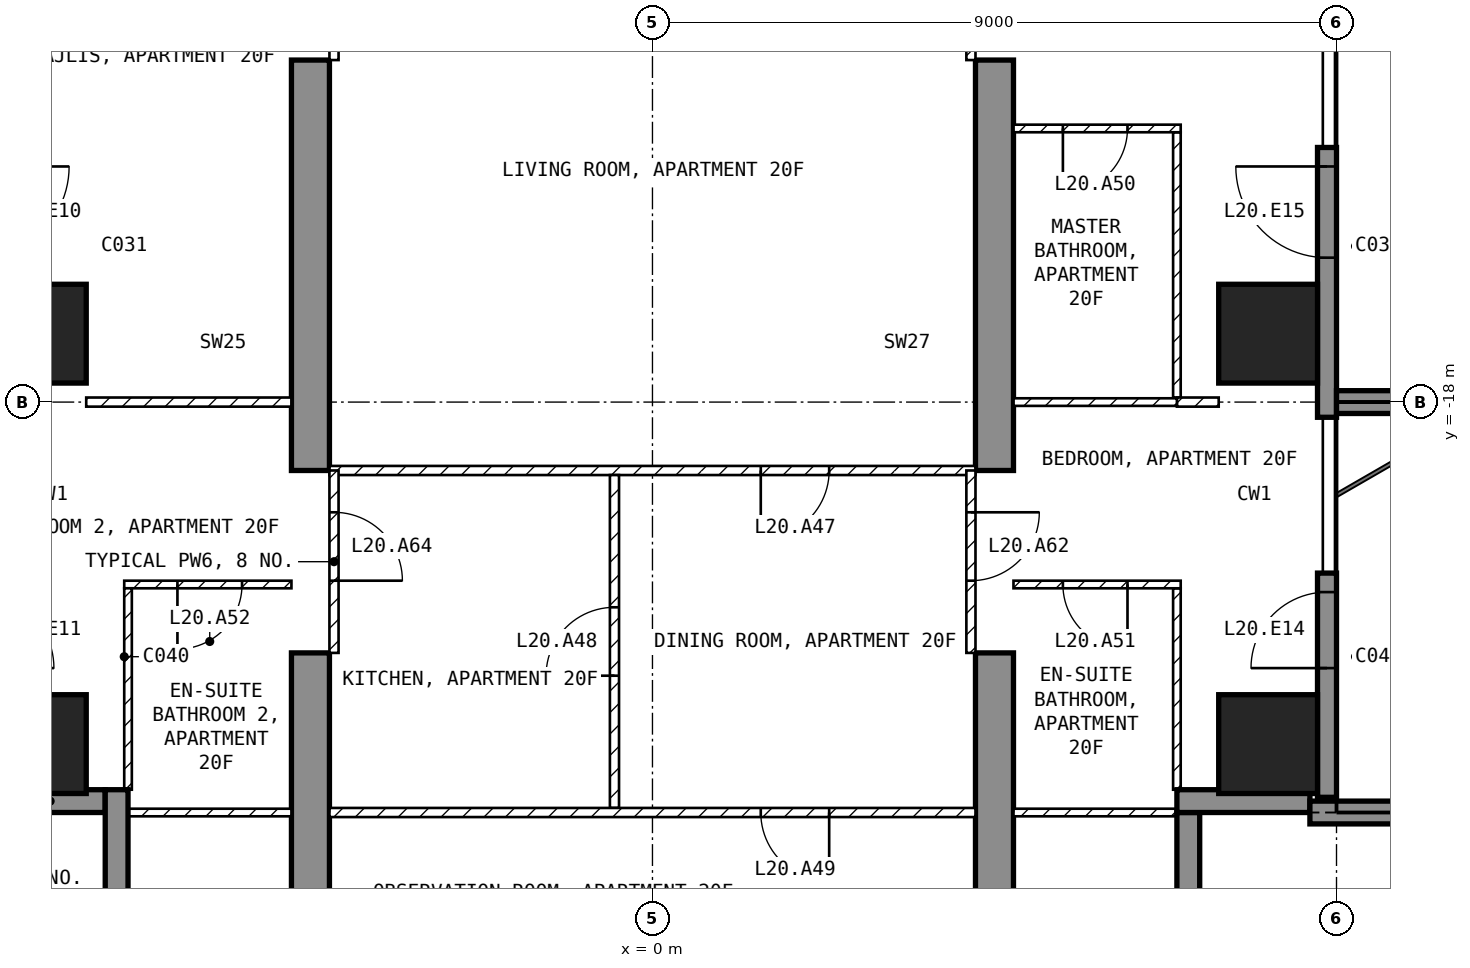
"""IFC4 building model, lengths in metres.
Left out: names, types, materials, properties, quantities, classifications, styles, units other than length and angle.
Written with IfcOpenShell. Run it as: python <this file> out.ifc"""

import sys

from ifc_helpers import new_model, si_unit, direction, frame, frame_2d, origin, origin_2d, place, context, subcontext, project, spatial, polyline, rectangle, outline, extrude, element, fill, save


model = new_model("IFC4")
c1 = context("Model", 3, precision=1e-05, world=origin(), true_north=direction((0.0, 1.0)))
c2 = subcontext(c1, "Body", "Model", "MODEL_VIEW")
j1 = project(units=[si_unit("LENGTHUNIT", "METRE"), si_unit("PLANEANGLEUNIT", "RADIAN")], contexts=[c1])
p1 = place(None, origin())
s1 = spatial("IfcSite", under=j1, at=p1, CompositionType="ELEMENT")
p2 = place(p1, origin())
s2 = spatial("IfcBuilding", under=s1, at=p2, CompositionType="ELEMENT")
p3 = place(p2, frame((0.0, 0.0, 89.0)))
s3 = spatial("IfcBuildingStorey", under=s2, at=p3, CompositionType="ELEMENT", Elevation=89.0)
for number, where, z_axis, x_axis in (
    (1, (-8.1, -22.5, -0.25), (0.0, 0.0, 1.0), (1.0, 0.0, 0.0)),
    (2, (-8.1, -17.1, -0.25), (0.0, 0.0, 1.0), (1.0, 0.0, 0.0)),
    (3, (8.1, -22.5, -0.25), (0.0, 0.0, 1.0), (1.0, 0.0, 0.0)),
    (4, (8.1, -17.1, -0.25), (0.0, 0.0, 1.0), (1.0, 0.0, 0.0)),
):
    element("IfcColumn", number, at=place(p3, frame(where, z_axis=z_axis, x_axis=x_axis)), inside=s3, PredefinedType="COLUMN", context=c2, shape_type="SweptSolid", body=[
        extrude(rectangle(XDim=1.3, YDim=1.3, at=origin_2d()), origin(), (0.0, 0.0, 1.0), 3.45),
    ])
for number, where, z_axis, x_axis in (
    (5, (-4.75, -25.45, -0.25), (1.0, 0.0, 0.0), (0.0, 1.0, 0.0)),
    (6, (4.25, -25.45, -0.25), (1.0, 0.0, 0.0), (0.0, 1.0, 0.0)),
):
    element("IfcWall", number, at=place(p3, frame(where, z_axis=z_axis, x_axis=x_axis)), inside=s3, PredefinedType="SHEAR", context=c2, shape_type="SweptSolid", body=[
        extrude(outline(polyline([(0.0, 0.0), (4.15, 0.0), (4.15, 2.65), (6.55, 2.65), (6.55, 0.0), (11.95, 0.0), (11.95, 2.65), (14.35, 2.65), (14.35, 0.0), (16.45, 0.0), (16.45, 3.45), (0.0, 3.45), (0.0, 0.0)])), origin(), (0.0, 0.0, 1.0), 0.5),
    ])
p4 = place(p3, frame((8.875, -23.2, 0.0), z_axis=(0.0, 0.0, 1.0), x_axis=(0.0, 1.0, 0.0)))
e7 = element("IfcWall", 7, at=p4, inside=s3, PredefinedType="SOLIDWALL", context=c2, shape_type="SweptSolid", body=[
    extrude(rectangle(XDim=2.95, YDim=0.25, at=frame_2d((1.475, 0.0))), origin(), (0.0, 0.0, 1.0), 3.2),
])
p5 = place(p4, frame((1.7, 0.0, 0.0)))
e8 = element("IfcOpeningElement", 8, at=p5, cuts=e7, PredefinedType="OPENING", context=c2, shape_type="SweptSolid", body=[
    extrude(rectangle(XDim=1.0, YDim=2.4, at=frame_2d((0.5, 1.2))), frame((0.0, 0.135, 0.0), z_axis=(0.0, -1.0, 0.0), x_axis=(1.0, 0.0, 0.0)), (0.0, 0.0, 1.0), 0.27),
])
p6 = place(p3, frame((8.875, -18.2, 0.0), z_axis=(0.0, 0.0, 1.0), x_axis=(0.0, 1.0, 0.0)))
e9 = element("IfcWall", 9, at=p6, inside=s3, PredefinedType="SOLIDWALL", context=c2, shape_type="SweptSolid", body=[
    extrude(rectangle(XDim=3.55, YDim=0.25, at=frame_2d((1.775, 0.0))), origin(), (0.0, 0.0, 1.0), 3.2),
])
p7 = place(p6, frame((2.1, 0.0, 0.0)))
e10 = element("IfcOpeningElement", 10, at=p7, cuts=e9, PredefinedType="OPENING", context=c2, shape_type="SweptSolid", body=[
    extrude(rectangle(XDim=1.2, YDim=2.4, at=frame_2d((0.6, 1.2))), frame((0.0, 0.135, 0.0), z_axis=(0.0, -1.0, 0.0), x_axis=(1.0, 0.0, 0.0)), (0.0, 0.0, 1.0), 0.27),
])
p8 = place(p3, frame((7.05, -25.2, 0.0), z_axis=(0.0, 0.0, 1.0), x_axis=(0.0, 1.0, 0.0)))
e11 = element("IfcWall", 11, at=p8, inside=s3, PredefinedType="SOLIDWALL", context=c2, shape_type="SweptSolid", body=[
    extrude(rectangle(XDim=1.8, YDim=0.3, at=frame_2d((0.9, 0.0))), origin(), (0.0, 0.0, 1.0), 3.2),
])
p9 = place(p3, frame((6.9, -23.25, 0.0), z_axis=(0.0, 0.0, 1.0), x_axis=(1.0, 0.0, 0.0)))
e12 = element("IfcWall", 12, at=p9, inside=s3, PredefinedType="SOLIDWALL", context=c2, shape_type="SweptSolid", body=[
    extrude(rectangle(XDim=1.75, YDim=0.3, at=frame_2d((0.875, 0.0))), origin(), (0.0, 0.0, 1.0), 3.2),
])
p10 = place(p3, frame((-8.65, -23.25, 0.0), z_axis=(0.0, 0.0, 1.0), x_axis=(1.0, 0.0, 0.0)))
e13 = element("IfcWall", 13, at=p10, inside=s3, PredefinedType="SOLIDWALL", context=c2, shape_type="SweptSolid", body=[
    extrude(rectangle(XDim=1.45, YDim=0.3, at=frame_2d((0.725, 0.0))), origin(), (0.0, 0.0, 1.0), 3.2),
])
p11 = place(p3, frame((-7.05, -23.1, 0.0), z_axis=(0.0, 0.0, 1.0), x_axis=(0.0, -1.0, 0.0)))
e14 = element("IfcWall", 14, at=p11, inside=s3, PredefinedType="SOLIDWALL", context=c2, shape_type="SweptSolid", body=[
    extrude(rectangle(XDim=1.8, YDim=0.3, at=frame_2d((0.9, 0.0))), origin(), (0.0, 0.0, 1.0), 3.2),
])
p12 = place(p3, frame((8.65, -23.4, 0.0), z_axis=(0.0, 0.0, 1.0), x_axis=(1.0, 0.0, 0.0)))
e15 = element("IfcWall", 15, at=p12, inside=s3, PredefinedType="SOLIDWALL", context=c2, shape_type="SweptSolid", body=[
    extrude(rectangle(XDim=3.05, YDim=0.3, at=frame_2d((1.525, 0.0))), origin(), (0.0, 0.0, 1.0), 3.2),
])
p13 = place(p3, frame((9.0, -18.0, 0.0), z_axis=(0.0, 0.0, 1.0), x_axis=(1.0, 0.0, 0.0)))
e16 = element("IfcWall", 16, at=p13, inside=s3, PredefinedType="SOLIDWALL", context=c2, shape_type="SweptSolid", body=[
    extrude(rectangle(XDim=2.7, YDim=0.3, at=frame_2d((1.35, 0.0))), origin(), (0.0, 0.0, 1.0), 3.2),
])
p14 = place(p3, frame((4.25, -18.9, 0.0), z_axis=(0.0, 0.0, 1.0), x_axis=(-1.0, 0.0, 0.0)))
e17 = element("IfcWall", 17, at=p14, inside=s3, PredefinedType="PARTITIONING", context=c2, shape_type="SweptSolid", body=[
    extrude(rectangle(XDim=8.5, YDim=0.12, at=frame_2d((4.25, 0.0))), origin(), (0.0, 0.0, 1.0), 3.2),
])
p15 = place(p14, frame((1.925, 0.0, 0.0)))
e18 = element("IfcOpeningElement", 18, at=p15, cuts=e17, PredefinedType="OPENING", context=c2, shape_type="SweptSolid", body=[
    extrude(rectangle(XDim=0.9, YDim=2.1, at=frame_2d((0.45, 1.05))), frame((0.0, 0.07, 0.0), z_axis=(0.0, -1.0, 0.0), x_axis=(1.0, 0.0, 0.0)), (0.0, 0.0, 1.0), 0.14),
])
p16 = place(p3, frame((-0.5, -23.34, 0.0), z_axis=(0.0, 0.0, 1.0), x_axis=(0.0, 1.0, 0.0)))
e19 = element("IfcWall", 19, at=p16, inside=s3, PredefinedType="PARTITIONING", context=c2, shape_type="SweptSolid", body=[
    extrude(rectangle(XDim=4.38, YDim=0.12, at=frame_2d((2.19, 0.0))), origin(), (0.0, 0.0, 1.0), 3.2),
])
p17 = place(p16, frame((1.74, 0.0, 0.0)))
e20 = element("IfcOpeningElement", 20, at=p17, cuts=e19, PredefinedType="OPENING", context=c2, shape_type="SweptSolid", body=[
    extrude(rectangle(XDim=0.9, YDim=2.1, at=frame_2d((0.45, 1.05))), frame((0.0, 0.07, 0.0), z_axis=(0.0, -1.0, 0.0), x_axis=(1.0, 0.0, 0.0)), (0.0, 0.0, 1.0), 0.14),
])
p18 = place(p3, frame((4.25, -23.4, 0.0), z_axis=(0.0, 0.0, 1.0), x_axis=(-1.0, 0.0, 0.0)))
e21 = element("IfcWall", 21, at=p18, inside=s3, PredefinedType="PARTITIONING", context=c2, shape_type="SweptSolid", body=[
    extrude(rectangle(XDim=8.5, YDim=0.12, at=frame_2d((4.25, 0.0))), origin(), (0.0, 0.0, 1.0), 3.2),
])
p19 = place(p18, frame((1.925, 0.0, 0.0)))
e22 = element("IfcOpeningElement", 22, at=p19, cuts=e21, PredefinedType="OPENING", context=c2, shape_type="SweptSolid", body=[
    extrude(rectangle(XDim=0.9, YDim=2.1, at=frame_2d((0.45, 1.05))), frame((0.0, 0.07, 0.0), z_axis=(0.0, -1.0, 0.0), x_axis=(1.0, 0.0, 0.0)), (0.0, 0.0, 1.0), 0.14),
])
p20 = place(p3, frame((6.9, -17.94, 0.0), z_axis=(0.0, 0.0, 1.0), x_axis=(0.0, 1.0, 0.0)))
e23 = element("IfcWall", 23, at=p20, inside=s3, PredefinedType="PARTITIONING", context=c2, shape_type="SweptSolid", body=[
    extrude(rectangle(XDim=3.49, YDim=0.1, at=frame_2d((1.745, 0.0))), origin(), (0.0, 0.0, 1.0), 3.2),
])
p21 = place(p3, frame((6.95, -14.4, 0.0), z_axis=(0.0, 0.0, 1.0), x_axis=(-1.0, 0.0, 0.0)))
e24 = element("IfcWall", 24, at=p21, inside=s3, PredefinedType="PARTITIONING", context=c2, shape_type="SweptSolid", body=[
    extrude(rectangle(XDim=2.2, YDim=0.1, at=frame_2d((1.1, 0.0))), origin(), (0.0, 0.0, 1.0), 3.2),
])
p22 = place(p21, frame((0.7, 0.0, 0.0)))
e25 = element("IfcOpeningElement", 25, at=p22, cuts=e24, PredefinedType="OPENING", context=c2, shape_type="SweptSolid", body=[
    extrude(rectangle(XDim=0.85, YDim=2.1, at=frame_2d((0.425, 1.05))), frame((0.0, 0.06, 0.0), z_axis=(0.0, -1.0, 0.0), x_axis=(1.0, 0.0, 0.0)), (0.0, 0.0, 1.0), 0.12),
])
p23 = place(p3, frame((7.45, -18.0, 0.0), z_axis=(0.0, 0.0, 1.0), x_axis=(-1.0, 0.0, 0.0)))
e26 = element("IfcWall", 26, at=p23, inside=s3, PredefinedType="PARTITIONING", context=c2, shape_type="SweptSolid", body=[
    extrude(rectangle(XDim=0.55, YDim=0.12, at=frame_2d((0.275, 0.0))), origin(), (0.0, 0.0, 1.0), 3.2),
])
p24 = place(p3, frame((6.9, -18.0, 0.0), z_axis=(0.0, 0.0, 1.0), x_axis=(-1.0, 0.0, 0.0)))
e27 = element("IfcWall", 27, at=p24, inside=s3, PredefinedType="PARTITIONING", context=c2, shape_type="SweptSolid", body=[
    extrude(rectangle(XDim=2.15, YDim=0.1, at=frame_2d((1.075, 0.0))), origin(), (0.0, 0.0, 1.0), 3.2),
])
p25 = place(p3, frame((6.9, -23.1, 0.0), z_axis=(0.0, 0.0, 1.0), x_axis=(0.0, 1.0, 0.0)))
e28 = element("IfcWall", 28, at=p25, inside=s3, PredefinedType="PARTITIONING", context=c2, shape_type="SweptSolid", body=[
    extrude(rectangle(XDim=2.65, YDim=0.1, at=frame_2d((1.325, 0.0))), origin(), (0.0, 0.0, 1.0), 3.2),
])
p26 = place(p3, frame((6.95, -20.4, 0.0), z_axis=(0.0, 0.0, 1.0), x_axis=(-1.0, 0.0, 0.0)))
e29 = element("IfcWall", 29, at=p26, inside=s3, PredefinedType="PARTITIONING", context=c2, shape_type="SweptSolid", body=[
    extrude(rectangle(XDim=2.2, YDim=0.1, at=frame_2d((1.1, 0.0))), origin(), (0.0, 0.0, 1.0), 3.2),
])
p27 = place(p26, frame((0.7, 0.0, 0.0)))
e30 = element("IfcOpeningElement", 30, at=p27, cuts=e29, PredefinedType="OPENING", context=c2, shape_type="SweptSolid", body=[
    extrude(rectangle(XDim=0.85, YDim=2.1, at=frame_2d((0.425, 1.05))), frame((0.0, 0.06, 0.0), z_axis=(0.0, -1.0, 0.0), x_axis=(1.0, 0.0, 0.0)), (0.0, 0.0, 1.0), 0.12),
])
p28 = place(p3, frame((7.12, -23.4, 0.0), z_axis=(0.0, 0.0, 1.0), x_axis=(-1.0, 0.0, 0.0)))
e31 = element("IfcWall", 31, at=p28, inside=s3, PredefinedType="PARTITIONING", context=c2, shape_type="SweptSolid", body=[
    extrude(rectangle(XDim=2.37, YDim=0.1, at=frame_2d((1.185, 0.0))), origin(), (0.0, 0.0, 1.0), 3.2),
])
p29 = place(p3, frame((-4.75, -18.0, 0.0), z_axis=(0.0, 0.0, 1.0), x_axis=(-1.0, 0.0, 0.0)))
e32 = element("IfcWall", 32, at=p29, inside=s3, PredefinedType="PARTITIONING", context=c2, shape_type="SweptSolid", body=[
    extrude(rectangle(XDim=2.7, YDim=0.12, at=frame_2d((1.35, 0.0))), origin(), (0.0, 0.0, 1.0), 3.2),
])
p30 = place(p3, frame((-4.75, -20.4, 0.0), z_axis=(0.0, 0.0, 1.0), x_axis=(-1.0, 0.0, 0.0)))
e33 = element("IfcWall", 33, at=p30, inside=s3, PredefinedType="PARTITIONING", context=c2, shape_type="SweptSolid", body=[
    extrude(rectangle(XDim=2.2, YDim=0.1, at=frame_2d((1.1, 0.0))), origin(), (0.0, 0.0, 1.0), 3.2),
])
p31 = place(p30, frame((0.65, 0.0, 0.0)))
e34 = element("IfcOpeningElement", 34, at=p31, cuts=e33, PredefinedType="OPENING", context=c2, shape_type="SweptSolid", body=[
    extrude(rectangle(XDim=0.85, YDim=2.1, at=frame_2d((0.425, 1.05))), frame((0.0, 0.06, 0.0), z_axis=(0.0, -1.0, 0.0), x_axis=(1.0, 0.0, 0.0)), (0.0, 0.0, 1.0), 0.12),
])
p32 = place(p3, frame((-6.9, -20.45, 0.0), z_axis=(0.0, 0.0, 1.0), x_axis=(0.0, -1.0, 0.0)))
e35 = element("IfcWall", 35, at=p32, inside=s3, PredefinedType="PARTITIONING", context=c2, shape_type="SweptSolid", body=[
    extrude(rectangle(XDim=2.65, YDim=0.1, at=frame_2d((1.325, 0.0))), origin(), (0.0, 0.0, 1.0), 3.2),
])
p33 = place(p3, frame((-4.75, -23.4, 0.0), z_axis=(0.0, 0.0, 1.0), x_axis=(-1.0, 0.0, 0.0)))
e36 = element("IfcWall", 36, at=p33, inside=s3, PredefinedType="PARTITIONING", context=c2, shape_type="SweptSolid", body=[
    extrude(rectangle(XDim=2.37, YDim=0.1, at=frame_2d((1.185, 0.0))), origin(), (0.0, 0.0, 1.0), 3.2),
])
p34 = place(p3, frame((4.19, -11.1, 0.0), z_axis=(0.0, 0.0, 1.0), x_axis=(0.0, -1.0, 0.0)))
e37 = element("IfcWall", 37, at=p34, inside=s3, PredefinedType="PARTITIONING", context=c2, shape_type="SweptSolid", body=[
    extrude(rectangle(XDim=2.4, YDim=0.12, at=frame_2d((1.2, 0.0))), origin(), (0.0, 0.0, 1.0), 2.4),
])
p35 = place(p34, frame((0.75, 0.0, 0.0)))
e38 = element("IfcOpeningElement", 38, at=p35, cuts=e37, PredefinedType="OPENING", context=c2, shape_type="SweptSolid", body=[
    extrude(rectangle(XDim=0.9, YDim=2.1, at=frame_2d((0.45, 1.05))), frame((0.0, 0.07, 0.0), z_axis=(0.0, -1.0, 0.0), x_axis=(1.0, 0.0, 0.0)), (0.0, 0.0, 1.0), 0.14),
])
p36 = place(p3, frame((4.19, -18.9, 0.0), z_axis=(0.0, 0.0, 1.0), x_axis=(0.0, -1.0, 0.0)))
e39 = element("IfcWall", 39, at=p36, inside=s3, PredefinedType="PARTITIONING", context=c2, shape_type="SweptSolid", body=[
    extrude(rectangle(XDim=2.4, YDim=0.12, at=frame_2d((1.2, 0.0))), origin(), (0.0, 0.0, 1.0), 2.4),
])
p37 = place(p36, frame((0.55, 0.0, 0.0)))
e40 = element("IfcOpeningElement", 40, at=p37, cuts=e39, PredefinedType="OPENING", context=c2, shape_type="SweptSolid", body=[
    extrude(rectangle(XDim=0.9, YDim=2.1, at=frame_2d((0.45, 1.05))), frame((0.0, 0.07, 0.0), z_axis=(0.0, -1.0, 0.0), x_axis=(1.0, 0.0, 0.0)), (0.0, 0.0, 1.0), 0.14),
])
p38 = place(p3, frame((-4.19, -11.1, 0.0), z_axis=(0.0, 0.0, 1.0), x_axis=(0.0, -1.0, 0.0)))
e41 = element("IfcWall", 41, at=p38, inside=s3, PredefinedType="PARTITIONING", context=c2, shape_type="SweptSolid", body=[
    extrude(rectangle(XDim=2.4, YDim=0.12, at=frame_2d((1.2, 0.0))), origin(), (0.0, 0.0, 1.0), 2.4),
])
p39 = place(p38, frame((0.75, 0.0, 0.0)))
e42 = element("IfcOpeningElement", 42, at=p39, cuts=e41, PredefinedType="OPENING", context=c2, shape_type="SweptSolid", body=[
    extrude(rectangle(XDim=0.9, YDim=2.1, at=frame_2d((0.45, 1.05))), frame((0.0, 0.07, 0.0), z_axis=(0.0, -1.0, 0.0), x_axis=(1.0, 0.0, 0.0)), (0.0, 0.0, 1.0), 0.14),
])
p40 = place(p3, frame((-4.19, -18.9, 0.0), z_axis=(0.0, 0.0, 1.0), x_axis=(0.0, -1.0, 0.0)))
e43 = element("IfcWall", 43, at=p40, inside=s3, PredefinedType="PARTITIONING", context=c2, shape_type="SweptSolid", body=[
    extrude(rectangle(XDim=2.4, YDim=0.12, at=frame_2d((1.2, 0.0))), origin(), (0.0, 0.0, 1.0), 2.4),
])
p41 = place(p40, frame((0.55, 0.0, 0.0)))
e44 = element("IfcOpeningElement", 44, at=p41, cuts=e43, PredefinedType="OPENING", context=c2, shape_type="SweptSolid", body=[
    extrude(rectangle(XDim=0.9, YDim=2.1, at=frame_2d((0.45, 1.05))), frame((0.0, 0.07, 0.0), z_axis=(0.0, -1.0, 0.0), x_axis=(1.0, 0.0, 0.0)), (0.0, 0.0, 1.0), 0.14),
])
p42 = place(p5, origin())
e45 = element("IfcDoor", 45, at=p42, inside=s3, OperationType="SINGLE_SWING_LEFT", PredefinedType="DOOR", context=c2, shape_type="SweptSolid", body=[
    extrude(rectangle(XDim=1.0, YDim=2.4, at=frame_2d((0.5, 1.2))), frame((0.0, 0.025, 0.0), z_axis=(0.0, -1.0, 0.0), x_axis=(1.0, 0.0, 0.0)), (0.0, 0.0, 1.0), 0.05),
])
fill(e8, e45)
p43 = place(p7, origin())
e46 = element("IfcDoor", 46, at=p43, inside=s3, OperationType="SINGLE_SWING_RIGHT", PredefinedType="DOOR", context=c2, shape_type="SweptSolid", body=[
    extrude(rectangle(XDim=1.2, YDim=2.4, at=frame_2d((0.6, 1.2))), frame((0.0, 0.025, 0.0), z_axis=(0.0, -1.0, 0.0), x_axis=(1.0, 0.0, 0.0)), (0.0, 0.0, 1.0), 0.05),
])
fill(e10, e46)
p44 = place(p15, origin())
e47 = element("IfcDoor", 47, at=p44, inside=s3, OperationType="SINGLE_SWING_RIGHT", PredefinedType="DOOR", context=c2, shape_type="SweptSolid", body=[
    extrude(rectangle(XDim=0.9, YDim=2.1, at=frame_2d((0.45, 1.05))), frame((0.0, 0.025, 0.0), z_axis=(0.0, -1.0, 0.0), x_axis=(1.0, 0.0, 0.0)), (0.0, 0.0, 1.0), 0.05),
])
fill(e18, e47)
p45 = place(p17, origin())
e48 = element("IfcDoor", 48, at=p45, inside=s3, OperationType="SINGLE_SWING_LEFT", PredefinedType="DOOR", context=c2, shape_type="SweptSolid", body=[
    extrude(rectangle(XDim=0.9, YDim=2.1, at=frame_2d((0.45, 1.05))), frame((0.0, 0.025, 0.0), z_axis=(0.0, -1.0, 0.0), x_axis=(1.0, 0.0, 0.0)), (0.0, 0.0, 1.0), 0.05),
])
fill(e20, e48)
p46 = place(p19, origin())
e49 = element("IfcDoor", 49, at=p46, inside=s3, OperationType="SINGLE_SWING_LEFT", PredefinedType="DOOR", context=c2, shape_type="SweptSolid", body=[
    extrude(rectangle(XDim=0.9, YDim=2.1, at=frame_2d((0.45, 1.05))), frame((0.0, 0.025, 0.0), z_axis=(0.0, -1.0, 0.0), x_axis=(1.0, 0.0, 0.0)), (0.0, 0.0, 1.0), 0.05),
])
fill(e22, e49)
p47 = place(p22, origin())
e50 = element("IfcDoor", 50, at=p47, inside=s3, OperationType="SINGLE_SWING_RIGHT", PredefinedType="DOOR", context=c2, shape_type="SweptSolid", body=[
    extrude(rectangle(XDim=0.85, YDim=2.1, at=frame_2d((0.425, 1.05))), frame((0.0, 0.025, 0.0), z_axis=(0.0, -1.0, 0.0), x_axis=(1.0, 0.0, 0.0)), (0.0, 0.0, 1.0), 0.05),
])
fill(e25, e50)
p48 = place(p27, origin())
e51 = element("IfcDoor", 51, at=p48, inside=s3, OperationType="SINGLE_SWING_LEFT", PredefinedType="DOOR", context=c2, shape_type="SweptSolid", body=[
    extrude(rectangle(XDim=0.85, YDim=2.1, at=frame_2d((0.425, 1.05))), frame((0.0, 0.025, 0.0), z_axis=(0.0, -1.0, 0.0), x_axis=(1.0, 0.0, 0.0)), (0.0, 0.0, 1.0), 0.05),
])
fill(e30, e51)
p49 = place(p31, origin())
e52 = element("IfcDoor", 52, at=p49, inside=s3, OperationType="SINGLE_SWING_RIGHT", PredefinedType="DOOR", context=c2, shape_type="SweptSolid", body=[
    extrude(rectangle(XDim=0.85, YDim=2.1, at=frame_2d((0.425, 1.05))), frame((0.0, 0.025, 0.0), z_axis=(0.0, -1.0, 0.0), x_axis=(1.0, 0.0, 0.0)), (0.0, 0.0, 1.0), 0.05),
])
fill(e34, e52)
p50 = place(p37, origin())
e53 = element("IfcDoor", 53, at=p50, inside=s3, OperationType="SINGLE_SWING_LEFT", PredefinedType="DOOR", context=c2, shape_type="SweptSolid", body=[
    extrude(rectangle(XDim=0.9, YDim=2.1, at=frame_2d((0.45, 1.05))), frame((0.0, 0.025, 0.0), z_axis=(0.0, -1.0, 0.0), x_axis=(1.0, 0.0, 0.0)), (0.0, 0.0, 1.0), 0.05),
])
fill(e40, e53)
p51 = place(p41, origin())
e54 = element("IfcDoor", 54, at=p51, inside=s3, OperationType="SINGLE_SWING_RIGHT", PredefinedType="DOOR", context=c2, shape_type="SweptSolid", body=[
    extrude(rectangle(XDim=0.9, YDim=2.1, at=frame_2d((0.45, 1.05))), frame((0.0, 0.025, 0.0), z_axis=(0.0, -1.0, 0.0), x_axis=(1.0, 0.0, 0.0)), (0.0, 0.0, 1.0), 0.05),
])
fill(e44, e54)
save(model, sys.argv[1])
